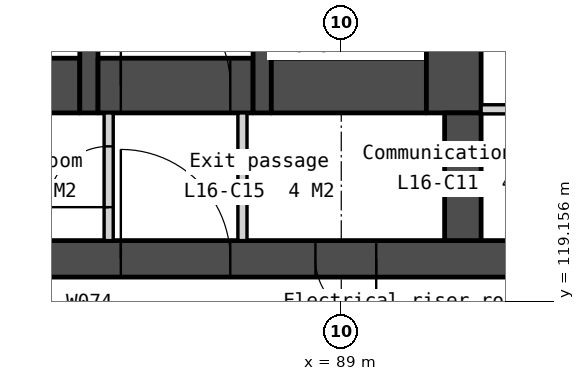
"""IFC4 building model, lengths in metres.
Left out: names, types, materials, properties, quantities, classifications, styles, units other than length and angle.
Written with IfcOpenShell. Run it as: python <this file> out.ifc"""

import sys

from ifc_helpers import new_model, si_unit, direction, frame, frame_2d, origin, place, context, subcontext, project, spatial, polyline, rectangle, outline, extrude, element, fill, save


model = new_model("IFC4")
c1 = context("Model", 3, precision=1e-05, world=origin(), true_north=direction((0.0, 1.0)))
c2 = subcontext(c1, "Body", "Model", "MODEL_VIEW")
j1 = project(units=[si_unit("LENGTHUNIT", "METRE"), si_unit("PLANEANGLEUNIT", "RADIAN")], contexts=[c1])
p1 = place(None, origin())
s1 = spatial("IfcSite", under=j1, at=p1, CompositionType="ELEMENT")
p2 = place(p1, origin())
s2 = spatial("IfcBuilding", under=s1, at=p2, CompositionType="ELEMENT")
p3 = place(p2, frame((0.0, 0.0, 70.0)))
s3 = spatial("IfcBuildingStorey", under=s2, at=p3, CompositionType="ELEMENT", Elevation=70.0)
p4 = place(p3, frame((66.0, 119.85, 0.0), z_axis=(0.0, 0.0, 1.0), x_axis=(1.0, 0.0, 0.0)))
e1 = element("IfcWall", 1, at=p4, inside=s3, PredefinedType="SOLIDWALL", context=c2, shape_type="SweptSolid", body=[
    extrude(rectangle(XDim=28.0, YDim=0.6, at=frame_2d((14.0, 0.0))), origin(), (0.0, 0.0, 1.0), 3.35),
])
p5 = place(p4, frame((6.825, 0.0, 0.0)))
e2 = element("IfcOpeningElement", 2, at=p5, cuts=e1, PredefinedType="OPENING", context=c2, shape_type="SweptSolid", body=[
    extrude(rectangle(XDim=1.8, YDim=2.1, at=frame_2d((0.9, 1.05))), frame((0.0, 0.31, 0.0), z_axis=(0.0, -1.0, 0.0), x_axis=(1.0, 0.0, 0.0)), (0.0, 0.0, 1.0), 0.62),
])
p6 = place(p4, frame((15.85, 0.0, 0.0)))
e3 = element("IfcOpeningElement", 3, at=p6, cuts=e1, PredefinedType="OPENING", context=c2, shape_type="SweptSolid", body=[
    extrude(rectangle(XDim=1.5, YDim=2.1, at=frame_2d((0.75, 1.05))), frame((0.0, 0.31, 0.0), z_axis=(0.0, -1.0, 0.0), x_axis=(1.0, 0.0, 0.0)), (0.0, 0.0, 1.0), 0.62),
])
p7 = place(p4, frame((19.375, 0.0, 0.0)))
e4 = element("IfcOpeningElement", 4, at=p7, cuts=e1, PredefinedType="OPENING", context=c2, shape_type="SweptSolid", body=[
    extrude(rectangle(XDim=1.8, YDim=2.1, at=frame_2d((0.9, 1.05))), frame((0.0, 0.31, 0.0), z_axis=(0.0, -1.0, 0.0), x_axis=(1.0, 0.0, 0.0)), (0.0, 0.0, 1.0), 0.62),
])
p8 = place(p4, frame((4.425, 0.0, 0.0)))
e5 = element("IfcOpeningElement", 5, at=p8, cuts=e1, PredefinedType="OPENING", context=c2, shape_type="SweptSolid", body=[
    extrude(rectangle(XDim=1.0, YDim=2.1, at=frame_2d((0.5, 1.05))), frame((0.0, 0.31, 0.0), z_axis=(0.0, -1.0, 0.0), x_axis=(1.0, 0.0, 0.0)), (0.0, 0.0, 1.0), 0.62),
])
p9 = place(p4, frame((9.783, 0.0, 0.0)))
e6 = element("IfcOpeningElement", 6, at=p9, cuts=e1, PredefinedType="OPENING", context=c2, shape_type="SweptSolid", body=[
    extrude(rectangle(XDim=1.0, YDim=2.1, at=frame_2d((0.5, 1.05))), frame((0.0, 0.31, 0.0), z_axis=(0.0, -1.0, 0.0), x_axis=(1.0, 0.0, 0.0)), (0.0, 0.0, 1.0), 0.62),
])
p10 = place(p4, frame((11.525, 0.0, 0.0)))
e7 = element("IfcOpeningElement", 7, at=p10, cuts=e1, PredefinedType="OPENING", context=c2, shape_type="SweptSolid", body=[
    extrude(rectangle(XDim=1.0, YDim=2.1, at=frame_2d((0.5, 1.05))), frame((0.0, 0.31, 0.0), z_axis=(0.0, -1.0, 0.0), x_axis=(1.0, 0.0, 0.0)), (0.0, 0.0, 1.0), 0.62),
])
p11 = place(p4, frame((13.658, 0.0, 0.0)))
e8 = element("IfcOpeningElement", 8, at=p11, cuts=e1, PredefinedType="OPENING", context=c2, shape_type="SweptSolid", body=[
    extrude(rectangle(XDim=1.0, YDim=2.1, at=frame_2d((0.5, 1.05))), frame((0.0, 0.31, 0.0), z_axis=(0.0, -1.0, 0.0), x_axis=(1.0, 0.0, 0.0)), (0.0, 0.0, 1.0), 0.62),
])
p12 = place(p4, frame((22.575, 0.0, 0.0)))
e9 = element("IfcOpeningElement", 9, at=p12, cuts=e1, PredefinedType="OPENING", context=c2, shape_type="SweptSolid", body=[
    extrude(rectangle(XDim=1.0, YDim=2.1, at=frame_2d((0.5, 1.05))), frame((0.0, 0.31, 0.0), z_axis=(0.0, -1.0, 0.0), x_axis=(1.0, 0.0, 0.0)), (0.0, 0.0, 1.0), 0.62),
])
p13 = place(p3, frame((81.8, 122.7, 0.0), z_axis=(0.0, 0.0, 1.0), x_axis=(1.0, 0.0, 0.0)))
e10 = element("IfcWall", 10, at=p13, inside=s3, PredefinedType="SOLIDWALL", context=c2, shape_type="SweptSolid", body=[
    extrude(rectangle(XDim=2.9, YDim=0.9, at=frame_2d((1.45, 0.0))), origin(), (0.0, 0.0, 1.0), 3.35),
])
p14 = place(p13, frame((0.05, 0.0, 0.0)))
e11 = element("IfcOpeningElement", 11, at=p14, cuts=e10, PredefinedType="OPENING", context=c2, shape_type="SweptSolid", body=[
    extrude(rectangle(XDim=1.5, YDim=2.1, at=frame_2d((0.75, 1.05))), frame((0.0, 0.46, 0.0), z_axis=(0.0, -1.0, 0.0), x_axis=(1.0, 0.0, 0.0)), (0.0, 0.0, 1.0), 0.92),
])
p15 = place(p3, frame((84.85, 133.95, 0.0), z_axis=(0.0, 0.0, 1.0), x_axis=(0.0, -1.0, 0.0)))
e12 = element("IfcWall", 12, at=p15, inside=s3, PredefinedType="SOLIDWALL", context=c2, shape_type="SweptSolid", body=[
    extrude(rectangle(XDim=11.7, YDim=0.3, at=frame_2d((5.85, 0.0))), origin(), (0.0, 0.0, 1.0), 3.35),
])
p16 = place(p3, frame((85.0, 122.7, 0.0), z_axis=(0.0, 0.0, 1.0), x_axis=(1.0, 0.0, 0.0)))
e13 = element("IfcWall", 13, at=p16, inside=s3, PredefinedType="SOLIDWALL", context=c2, shape_type="SweptSolid", body=[
    extrude(rectangle(XDim=2.55, YDim=0.9, at=frame_2d((1.275, 0.0))), origin(), (0.0, 0.0, 1.0), 3.35),
])
p17 = place(p16, frame((0.375, 0.0, 0.0)))
e14 = element("IfcOpeningElement", 14, at=p17, cuts=e13, PredefinedType="OPENING", context=c2, shape_type="SweptSolid", body=[
    extrude(rectangle(XDim=1.8, YDim=2.1, at=frame_2d((0.9, 1.05))), frame((0.0, 0.46, 0.0), z_axis=(0.0, -1.0, 0.0), x_axis=(1.0, 0.0, 0.0)), (0.0, 0.0, 1.0), 0.92),
])
p18 = place(p3, frame((85.175, 122.25, 0.0), z_axis=(0.0, 0.0, 1.0), x_axis=(0.0, -1.0, 0.0)))
e15 = element("IfcWall", 15, at=p18, inside=s3, PredefinedType="PARTITIONING", context=c2, shape_type="SweptSolid", body=[
    extrude(rectangle(XDim=2.1, YDim=0.15, at=frame_2d((1.05, 0.0))), origin(), (0.0, 0.0, 1.0), 3.35),
])
p19 = place(p18, frame((0.55, 0.0, 0.0)))
e16 = element("IfcOpeningElement", 16, at=p19, cuts=e15, PredefinedType="OPENING", context=c2, shape_type="SweptSolid", body=[
    extrude(rectangle(XDim=1.0, YDim=2.1, at=frame_2d((0.5, 1.05))), frame((0.0, 0.085, 0.0), z_axis=(0.0, -1.0, 0.0), x_axis=(1.0, 0.0, 0.0)), (0.0, 0.0, 1.0), 0.17),
])
p20 = place(p3, frame((87.375, 122.25, 0.0), z_axis=(0.0, 0.0, 1.0), x_axis=(0.0, -1.0, 0.0)))
e17 = element("IfcWall", 17, at=p20, inside=s3, PredefinedType="PARTITIONING", context=c2, shape_type="SweptSolid", body=[
    extrude(rectangle(XDim=2.1, YDim=0.15, at=frame_2d((1.05, 0.0))), origin(), (0.0, 0.0, 1.0), 3.35),
])
p21 = place(p3, frame((87.7, 133.95, 0.0), z_axis=(0.0, 0.0, 1.0), x_axis=(0.0, -1.0, 0.0)))
e18 = element("IfcWall", 18, at=p21, inside=s3, PredefinedType="SOLIDWALL", context=c2, shape_type="SweptSolid", body=[
    extrude(rectangle(XDim=11.7, YDim=0.3, at=frame_2d((5.85, 0.0))), origin(), (0.0, 0.0, 1.0), 3.35),
])
p22 = place(p21, frame((6.95, 0.0, 0.0)))
e19 = element("IfcOpeningElement", 19, at=p22, cuts=e18, PredefinedType="OPENING", context=c2, shape_type="SweptSolid", body=[
    extrude(rectangle(XDim=1.1, YDim=2.1, at=frame_2d((0.55, 1.05))), frame((0.0, 0.16, 0.0), z_axis=(0.0, -1.0, 0.0), x_axis=(1.0, 0.0, 0.0)), (0.0, 0.0, 1.0), 0.32),
])
p23 = place(p21, frame((5.1, 0.0, 0.0)))
e20 = element("IfcOpeningElement", 20, at=p23, cuts=e18, PredefinedType="OPENING", context=c2, shape_type="SweptSolid", body=[
    extrude(rectangle(XDim=1.0, YDim=2.1, at=frame_2d((0.5, 1.05))), frame((0.0, 0.16, 0.0), z_axis=(0.0, -1.0, 0.0), x_axis=(1.0, 0.0, 0.0)), (0.0, 0.0, 1.0), 0.32),
])
p24 = place(p21, frame((9.25, 0.0, 0.0)))
e21 = element("IfcOpeningElement", 21, at=p24, cuts=e18, PredefinedType="OPENING", context=c2, shape_type="SweptSolid", body=[
    extrude(rectangle(XDim=1.1, YDim=2.1, at=frame_2d((0.55, 1.05))), frame((0.0, 0.16, 0.0), z_axis=(0.0, -1.0, 0.0), x_axis=(1.0, 0.0, 0.0)), (0.0, 0.0, 1.0), 0.32),
])
p25 = place(p3, frame((87.85, 122.7, 0.0), z_axis=(0.0, 0.0, 1.0), x_axis=(1.0, 0.0, 0.0)))
e22 = element("IfcWall", 22, at=p25, inside=s3, PredefinedType="SOLIDWALL", context=c2, shape_type="SweptSolid", body=[
    extrude(rectangle(XDim=2.55, YDim=0.9, at=frame_2d((1.275, 0.0))), origin(), (0.0, 0.0, 1.0), 3.35),
])
p26 = place(p3, frame((90.85, 133.95, 0.0), z_axis=(0.0, 0.0, 1.0), x_axis=(0.0, -1.0, 0.0)))
e23 = element("IfcWall", 23, at=p26, inside=s3, PredefinedType="SOLIDWALL", context=c2, shape_type="SweptSolid", body=[
    extrude(rectangle(XDim=11.7, YDim=0.9, at=frame_2d((5.85, 0.0))), origin(), (0.0, 0.0, 1.0), 3.35),
])
p27 = place(p3, frame((91.0, 122.25, 0.0), z_axis=(0.0, 0.0, 1.0), x_axis=(0.0, -1.0, 0.0)))
e24 = element("IfcWall", 24, at=p27, inside=s3, PredefinedType="SOLIDWALL", context=c2, shape_type="SweptSolid", body=[
    extrude(rectangle(XDim=2.1, YDim=0.6, at=frame_2d((1.05, 0.0))), origin(), (0.0, 0.0, 1.0), 3.35),
])
p28 = place(p3, frame((91.3, 122.309, 0.0), z_axis=(0.0, 0.0, 1.0), x_axis=(1.0, 0.0, 0.0)))
e25 = element("IfcWall", 25, at=p28, inside=s3, PredefinedType="PARTITIONING", context=c2, shape_type="SweptSolid", body=[
    extrude(rectangle(XDim=2.1, YDim=0.15, at=frame_2d((1.05, 0.0))), origin(), (0.0, 0.0, 1.0), 3.35),
])
p29 = place(p3, frame((88.435, 99.831, -0.15), z_axis=(0.0, 0.0, 1.0), x_axis=(0.500000806382, 0.866024938219, 0.0)))
e26 = element("IfcWall", 26, at=p29, inside=s3, PredefinedType="SOLIDWALL", context=c2, shape_type="SweptSolid", body=[
    extrude(outline(polyline([(34.14, 3.5), (34.14, 0.0), (0.0, 0.0), (0.0, 3.5), (34.14, 3.5)])), frame((0.0, 0.225, 0.0), z_axis=(0.0, -1.0, 0.0), x_axis=(1.0, 0.0, 0.0)), (0.0, 0.0, 1.0), 0.45),
])
p30 = place(p29, frame((5.21, 0.0, 1.05)))
e27 = element("IfcOpeningElement", 27, at=p30, cuts=e26, PredefinedType="OPENING", context=c2, shape_type="SweptSolid", body=[
    extrude(rectangle(XDim=1.8, YDim=1.5, at=frame_2d((0.9, 0.75))), frame((0.0, 0.235, 0.0), z_axis=(0.0, -1.0, 0.0), x_axis=(1.0, 0.0, 0.0)), (0.0, 0.0, 1.0), 0.47),
])
p31 = place(p29, frame((7.51, 0.0, 1.05)))
e28 = element("IfcOpeningElement", 28, at=p31, cuts=e26, PredefinedType="OPENING", context=c2, shape_type="SweptSolid", body=[
    extrude(rectangle(XDim=1.8, YDim=1.5, at=frame_2d((0.9, 0.75))), frame((0.0, 0.235, 0.0), z_axis=(0.0, -1.0, 0.0), x_axis=(1.0, 0.0, 0.0)), (0.0, 0.0, 1.0), 0.47),
])
p32 = place(p29, frame((14.17, 0.0, 1.05)))
e29 = element("IfcOpeningElement", 29, at=p32, cuts=e26, PredefinedType="OPENING", context=c2, shape_type="SweptSolid", body=[
    extrude(rectangle(XDim=1.8, YDim=1.5, at=frame_2d((0.9, 0.75))), frame((0.0, 0.235, 0.0), z_axis=(0.0, -1.0, 0.0), x_axis=(1.0, 0.0, 0.0)), (0.0, 0.0, 1.0), 0.47),
])
p33 = place(p29, frame((16.47, 0.0, 1.05)))
e30 = element("IfcOpeningElement", 30, at=p33, cuts=e26, PredefinedType="OPENING", context=c2, shape_type="SweptSolid", body=[
    extrude(rectangle(XDim=1.8, YDim=1.5, at=frame_2d((0.9, 0.75))), frame((0.0, 0.235, 0.0), z_axis=(0.0, -1.0, 0.0), x_axis=(1.0, 0.0, 0.0)), (0.0, 0.0, 1.0), 0.47),
])
p34 = place(p29, frame((23.13, 0.0, 1.05)))
e31 = element("IfcOpeningElement", 31, at=p34, cuts=e26, PredefinedType="OPENING", context=c2, shape_type="SweptSolid", body=[
    extrude(rectangle(XDim=1.8, YDim=1.5, at=frame_2d((0.9, 0.75))), frame((0.0, 0.235, 0.0), z_axis=(0.0, -1.0, 0.0), x_axis=(1.0, 0.0, 0.0)), (0.0, 0.0, 1.0), 0.47),
])
p35 = place(p29, frame((25.43, 0.0, 1.05)))
e32 = element("IfcOpeningElement", 32, at=p35, cuts=e26, PredefinedType="OPENING", context=c2, shape_type="SweptSolid", body=[
    extrude(rectangle(XDim=1.8, YDim=1.5, at=frame_2d((0.9, 0.75))), frame((0.0, 0.235, 0.0), z_axis=(0.0, -1.0, 0.0), x_axis=(1.0, 0.0, 0.0)), (0.0, 0.0, 1.0), 0.47),
])
p36 = place(p29, frame((32.154, 0.0, 1.05)))
e33 = element("IfcOpeningElement", 33, at=p36, cuts=e26, PredefinedType="OPENING", context=c2, shape_type="SweptSolid", body=[
    extrude(rectangle(XDim=1.2, YDim=1.5, at=frame_2d((0.6, 0.75))), frame((0.0, 0.235, 0.0), z_axis=(0.0, -1.0, 0.0), x_axis=(1.0, 0.0, 0.0)), (0.0, 0.0, 1.0), 0.47),
])
p37 = place(p17, origin())
e34 = element("IfcDoor", 34, at=p37, inside=s3, OperationType="DOUBLE_DOOR_DOUBLE_SWING", PredefinedType="DOOR", context=c2, shape_type="SweptSolid", body=[
    extrude(rectangle(XDim=1.8, YDim=2.1, at=frame_2d((0.9, 1.05))), frame((0.0, 0.025, 0.0), z_axis=(0.0, -1.0, 0.0), x_axis=(1.0, 0.0, 0.0)), (0.0, 0.0, 1.0), 0.05),
])
fill(e14, e34)
p38 = place(p7, origin())
e35 = element("IfcDoor", 35, at=p38, inside=s3, OperationType="DOUBLE_DOOR_DOUBLE_SWING", PredefinedType="DOOR", context=c2, shape_type="SweptSolid", body=[
    extrude(rectangle(XDim=1.8, YDim=2.1, at=frame_2d((0.9, 1.05))), frame((0.0, 0.025, 0.0), z_axis=(0.0, -1.0, 0.0), x_axis=(1.0, 0.0, 0.0)), (0.0, 0.0, 1.0), 0.05),
])
fill(e4, e35)
p39 = place(p19, origin())
e36 = element("IfcDoor", 36, at=p39, inside=s3, OperationType="SINGLE_SWING_RIGHT", PredefinedType="DOOR", context=c2, shape_type="SweptSolid", body=[
    extrude(rectangle(XDim=1.0, YDim=2.1, at=frame_2d((0.5, 1.05))), frame((0.0, 0.025, 0.0), z_axis=(0.0, -1.0, 0.0), x_axis=(1.0, 0.0, 0.0)), (0.0, 0.0, 1.0), 0.05),
])
fill(e16, e36)
p40 = place(p12, origin())
e37 = element("IfcDoor", 37, at=p40, inside=s3, OperationType="SINGLE_SWING_RIGHT", PredefinedType="DOOR", context=c2, shape_type="SweptSolid", body=[
    extrude(rectangle(XDim=1.0, YDim=2.1, at=frame_2d((0.5, 1.05))), frame((0.0, 0.025, 0.0), z_axis=(0.0, -1.0, 0.0), x_axis=(1.0, 0.0, 0.0)), (0.0, 0.0, 1.0), 0.05),
])
fill(e9, e37)
save(model, sys.argv[1])
